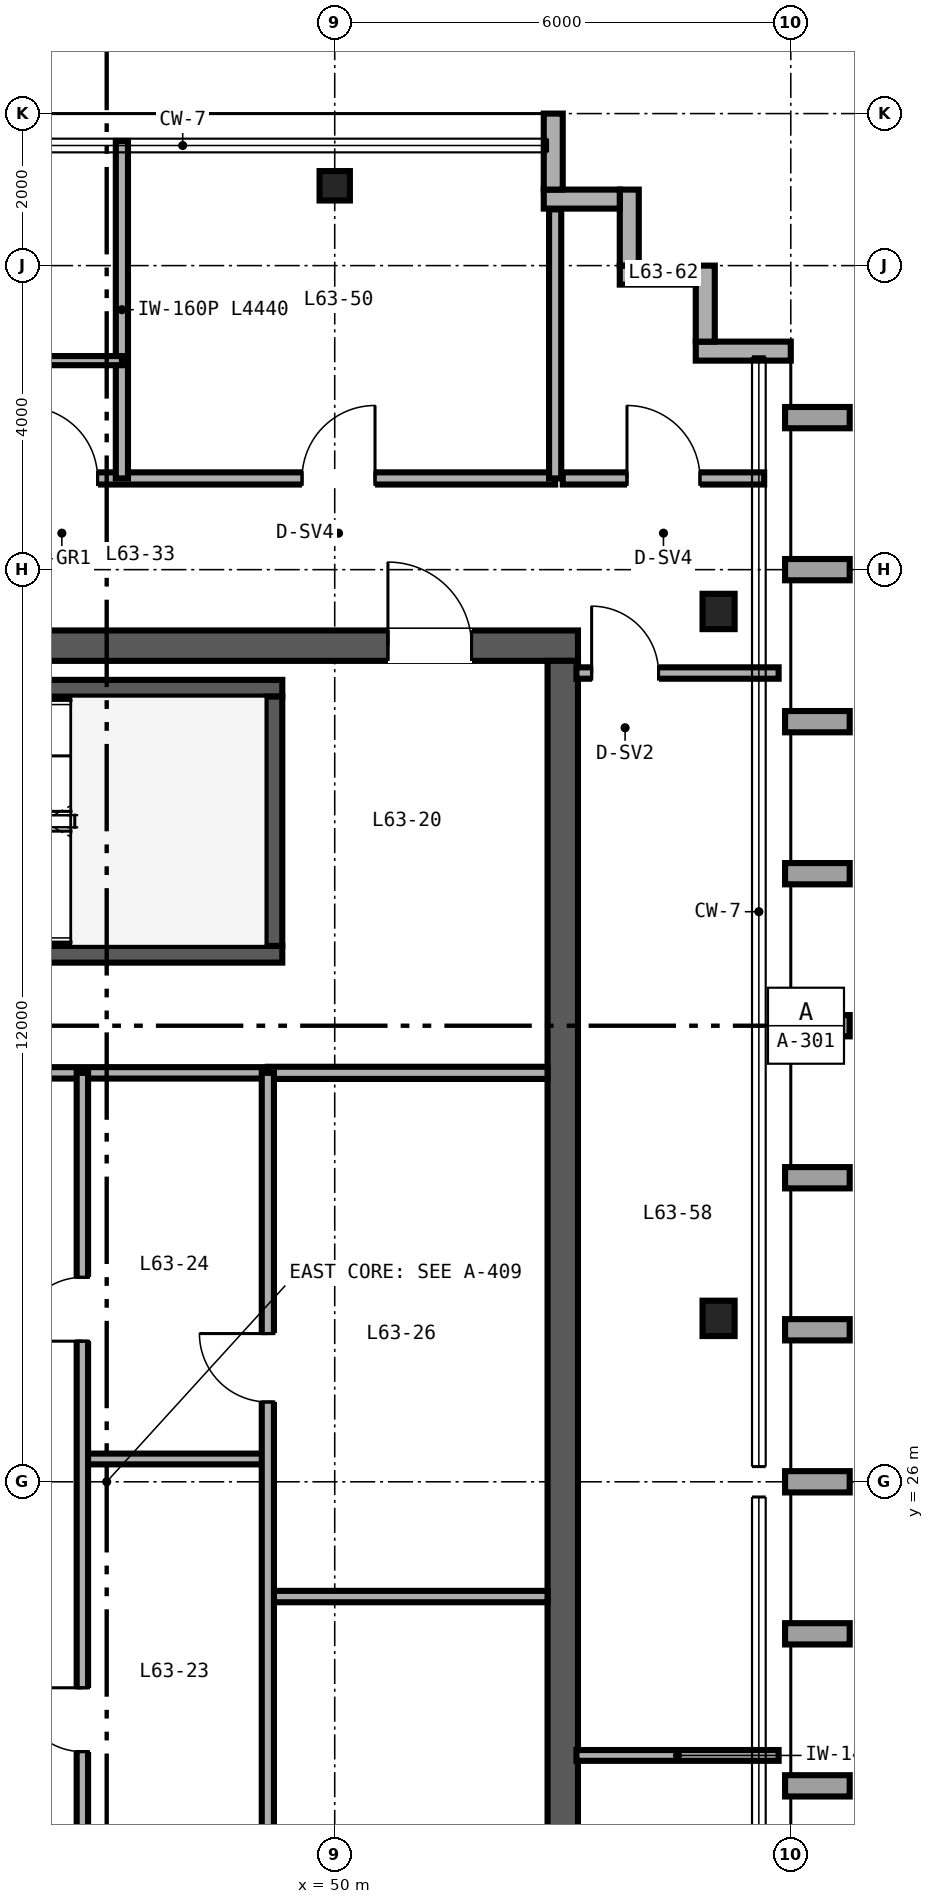
"""IFC4 building model, lengths in metres.
Left out: names, types, materials, properties, quantities, classifications, styles, units other than length and angle.
Written with IfcOpenShell. Run it as: python <this file> out.ifc"""

import sys

from ifc_helpers import new_model, si_unit, direction, frame, frame_2d, origin, origin_2d, place, context, subcontext, project, spatial, rectangle, i_section, extrude, source, transform, mapped, element, fill, save


model = new_model("IFC4")
c1 = context("Model", 3, precision=1e-05, world=origin(), true_north=direction((0.0, 1.0)))
c2 = subcontext(c1, "Body", "Model", "MODEL_VIEW")
j1 = project(units=[si_unit("LENGTHUNIT", "METRE"), si_unit("PLANEANGLEUNIT", "RADIAN")], contexts=[c1])
p1 = place(None, origin())
s1 = spatial("IfcSite", under=j1, at=p1, CompositionType="ELEMENT")
p2 = place(p1, origin())
s2 = spatial("IfcBuilding", under=s1, at=p2, CompositionType="ELEMENT")
p3 = place(p2, frame((0.0, 0.0, 250.8)))
s3 = spatial("IfcBuildingStorey", under=s2, at=p3, CompositionType="ELEMENT", Elevation=250.8)
p4 = place(p3, frame((40.8, 37.0, 0.0), z_axis=(0.0, 0.0, 1.0), x_axis=(1.0, 0.0, 0.0)))
e1 = element("IfcWall", 1, at=p4, inside=s3, PredefinedType="SHEAR", context=c2, shape_type="SweptSolid", body=[
    extrude(rectangle(XDim=12.4, YDim=0.4, at=frame_2d((6.2, 0.0))), origin(), (0.0, 0.0, 1.0), 3.38),
])
p5 = place(p4, frame((9.9, 0.0, 0.0)))
e2 = element("IfcOpeningElement", 2, at=p5, cuts=e1, PredefinedType="OPENING", context=c2, shape_type="SweptSolid", body=[
    extrude(rectangle(XDim=1.1, YDim=2.15, at=frame_2d((0.55, 1.075))), frame((0.0, 0.21, 0.0), z_axis=(0.0, -1.0, 0.0), x_axis=(1.0, 0.0, 0.0)), (0.0, 0.0, 1.0), 0.42),
])
p6 = place(p3, frame((53.0, 15.2, 0.0), z_axis=(0.0, 0.0, 1.0), x_axis=(0.0, 1.0, 0.0)))
e3 = element("IfcWall", 3, at=p6, inside=s3, PredefinedType="SHEAR", context=c2, shape_type="SweptSolid", body=[
    extrude(rectangle(XDim=21.6, YDim=0.4, at=frame_2d((10.8, 0.0))), origin(), (0.0, 0.0, 1.0), 3.38),
])
p7 = place(p3, frame((41.2, 32.94, 0.0), z_axis=(0.0, 0.0, 1.0), x_axis=(1.0, 0.0, 0.0)))
e4 = element("IfcWall", 4, at=p7, inside=s3, PredefinedType="SHEAR", context=c2, shape_type="SweptSolid", body=[
    extrude(rectangle(XDim=8.11, YDim=0.22, at=frame_2d((4.055, 0.0))), origin(), (0.0, 0.0, 1.0), 3.4),
])
p8 = place(p7, frame((0.72, 0.0, 0.0)))
e5 = element("IfcOpeningElement", 5, at=p8, cuts=e4, PredefinedType="OPENING", context=c2, shape_type="SweptSolid", body=[
    extrude(rectangle(XDim=1.05, YDim=2.15, at=frame_2d((0.525, 1.075))), frame((0.0, 0.12, 0.0), z_axis=(0.0, -1.0, 0.0), x_axis=(1.0, 0.0, 0.0)), (0.0, 0.0, 1.0), 0.24),
])
p9 = place(p3, frame((41.2, 36.44, 0.0), z_axis=(0.0, 0.0, 1.0), x_axis=(1.0, 0.0, 0.0)))
e6 = element("IfcWall", 6, at=p9, inside=s3, PredefinedType="SHEAR", context=c2, shape_type="SweptSolid", body=[
    extrude(rectangle(XDim=8.11, YDim=0.22, at=frame_2d((4.055, 0.0))), origin(), (0.0, 0.0, 1.0), 3.4),
])
p10 = place(p3, frame((49.2, 33.05, 0.0), z_axis=(0.0, 0.0, 1.0), x_axis=(0.0, 1.0, 0.0)))
e7 = element("IfcWall", 7, at=p10, inside=s3, PredefinedType="SHEAR", context=c2, shape_type="SweptSolid", body=[
    extrude(rectangle(XDim=3.28, YDim=0.22, at=frame_2d((1.64, 0.0))), origin(), (0.0, 0.0, 1.0), 3.4),
])
m1 = source(origin(), c2, "Body", "SweptSolid", [
    extrude(i_section(OverallWidth=0.422, OverallDepth=0.465, WebThickness=0.045, FlangeThickness=0.073, FilletRadius=0.025, at=origin_2d()), origin(), (0.0, 0.0, 1.0), 3.38),
])
for number, where, z_axis, x_axis in (
    (8, (55.05, 28.15, 0.0), (0.0, 0.0, 1.0), (1.0, 0.0, 0.0)),
    (9, (55.05, 37.45, 0.0), (0.0, 0.0, 1.0), (1.0, 0.0, 0.0)),
):
    element("IfcColumn", number, at=place(p3, frame(where, z_axis=z_axis, x_axis=x_axis)), inside=s3, PredefinedType="COLUMN", context=c2, shape_type="MappedRepresentation", body=[
        mapped(m1, transform((0.0, 0.0, 0.0), scale=1.0)),
    ])
m2 = source(origin(), c2, "Body", "SweptSolid", [
    extrude(i_section(OverallWidth=0.399, OverallDepth=0.387, WebThickness=0.021, FlangeThickness=0.033, FilletRadius=0.025, at=origin_2d()), origin(), (0.0, 0.0, 1.0), 3.38),
])
p11 = place(p3, frame((50.0, 43.05, 0.0), z_axis=(0.0, 0.0, 1.0), x_axis=(1.0, 0.0, 0.0)))
e10 = element("IfcColumn", 10, at=p11, inside=s3, PredefinedType="COLUMN", context=c2, shape_type="MappedRepresentation", body=[
    mapped(m2, transform((0.0, 0.0, 0.0), scale=1.0)),
])
p12 = place(p3, frame((56.0, 40.875, 0.0), z_axis=(0.0, 0.0, 1.0), x_axis=(-1.0, 0.0, 0.0)))
e11 = element("IfcWall", 11, at=p12, inside=s3, PredefinedType="SOLIDWALL", context=c2, shape_type="SweptSolid", body=[
    extrude(rectangle(XDim=1.25, YDim=0.25, at=frame_2d((0.625, 0.0))), origin(), (0.0, 0.0, 1.0), 3.38),
])
for number, where, z_axis, x_axis in (
    (12, (54.875, 41.0, 0.0), (0.0, 0.0, 1.0), (0.0, 1.0, 0.0)),
    (13, (54.75, 41.875, 0.0), (0.0, 0.0, 1.0), (-1.0, 0.0, 0.0)),
    (14, (53.875, 42.0, 0.0), (0.0, 0.0, 1.0), (0.0, 1.0, 0.0)),
    (15, (53.75, 42.875, 0.0), (0.0, 0.0, 1.0), (-1.0, 0.0, 0.0)),
    (16, (52.875, 43.0, 0.0), (0.0, 0.0, 1.0), (0.0, 1.0, 0.0)),
):
    element("IfcWall", number, at=place(p3, frame(where, z_axis=z_axis, x_axis=x_axis)), inside=s3, PredefinedType="SOLIDWALL", context=c2, shape_type="SweptSolid", body=[
        extrude(rectangle(XDim=1.0, YDim=0.25, at=frame_2d((0.5, 0.0))), origin(), (0.0, 0.0, 1.0), 3.38),
    ])
p13 = place(p3, frame((41.25, 31.38, 0.0), z_axis=(0.0, 0.0, 1.0), x_axis=(1.0, 0.0, 0.0)))
e17 = element("IfcWall", 17, at=p13, inside=s3, PredefinedType="PARTITIONING", context=c2, shape_type="SweptSolid", body=[
    extrude(rectangle(XDim=7.87, YDim=0.15, at=frame_2d((3.935, 0.0))), origin(), (0.0, 0.0, 1.0), 2.48),
])
p14 = place(p13, frame((3.6, 0.0, 0.0)))
e18 = element("IfcOpeningElement", 18, at=p14, cuts=e17, PredefinedType="OPENING", context=c2, shape_type="SweptSolid", body=[
    extrude(rectangle(XDim=0.9, YDim=2.15, at=frame_2d((0.45, 1.075))), frame((0.0, 0.085, 0.0), z_axis=(0.0, -1.0, 0.0), x_axis=(1.0, 0.0, 0.0)), (0.0, 0.0, 1.0), 0.17),
])
p15 = place(p3, frame((46.68, 26.3, 0.0), z_axis=(0.0, 0.0, 1.0), x_axis=(1.0, 0.0, 0.0)))
e19 = element("IfcWall", 19, at=p15, inside=s3, PredefinedType="PARTITIONING", context=c2, shape_type="SweptSolid", body=[
    extrude(rectangle(XDim=2.44, YDim=0.142, at=frame_2d((1.22, 0.0))), origin(), (0.0, 0.0, 1.0), 3.38),
])
p16 = place(p3, frame((46.68, 15.25, 0.0), z_axis=(0.0, 0.0, 1.0), x_axis=(0.0, 1.0, 0.0)))
e20 = element("IfcWall", 20, at=p16, inside=s3, PredefinedType="PARTITIONING", context=c2, shape_type="SweptSolid", body=[
    extrude(rectangle(XDim=16.13, YDim=0.15, at=frame_2d((8.065, 0.0))), origin(), (0.0, 0.0, 1.0), 2.453),
])
p17 = place(p16, frame((2.0, 0.0, 0.0)))
e21 = element("IfcOpeningElement", 21, at=p17, cuts=e20, PredefinedType="OPENING", context=c2, shape_type="SweptSolid", body=[
    extrude(rectangle(XDim=0.84, YDim=2.1, at=frame_2d((0.42, 1.05))), frame((0.0, 0.085, 0.0), z_axis=(0.0, -1.0, 0.0), x_axis=(1.0, 0.0, 0.0)), (0.0, 0.0, 1.0), 0.17),
])
p18 = place(p16, frame((7.2, 0.0, 0.0)))
e22 = element("IfcOpeningElement", 22, at=p18, cuts=e20, PredefinedType="OPENING", context=c2, shape_type="SweptSolid", body=[
    extrude(rectangle(XDim=0.84, YDim=2.1, at=frame_2d((0.42, 1.05))), frame((0.0, 0.085, 0.0), z_axis=(0.0, -1.0, 0.0), x_axis=(1.0, 0.0, 0.0)), (0.0, 0.0, 1.0), 0.17),
])
p19 = place(p16, frame((12.6, 0.0, 0.0)))
e23 = element("IfcOpeningElement", 23, at=p19, cuts=e20, PredefinedType="OPENING", context=c2, shape_type="SweptSolid", body=[
    extrude(rectangle(XDim=0.84, YDim=2.1, at=frame_2d((0.42, 1.05))), frame((0.0, 0.085, 0.0), z_axis=(0.0, -1.0, 0.0), x_axis=(1.0, 0.0, 0.0)), (0.0, 0.0, 1.0), 0.17),
])
p20 = place(p3, frame((49.12, 31.38, 0.0), z_axis=(0.0, 0.0, 1.0), x_axis=(1.0, 0.0, 0.0)))
e24 = element("IfcWall", 24, at=p20, inside=s3, PredefinedType="PARTITIONING", context=c2, shape_type="SweptSolid", body=[
    extrude(rectangle(XDim=3.68, YDim=0.16, at=frame_2d((1.84, 0.0))), origin(), (0.0, 0.0, 1.0), 2.48),
])
p21 = place(p3, frame((49.12, 24.49, 0.0), z_axis=(0.0, 0.0, 1.0), x_axis=(1.0, 0.0, 0.0)))
e25 = element("IfcWall", 25, at=p21, inside=s3, PredefinedType="PARTITIONING", context=c2, shape_type="SweptSolid", body=[
    extrude(rectangle(XDim=3.68, YDim=0.15, at=frame_2d((1.84, 0.0))), origin(), (0.0, 0.0, 1.0), 3.38),
])
p22 = place(p3, frame((49.12, 15.25, 0.0), z_axis=(0.0, 0.0, 1.0), x_axis=(0.0, 1.0, 0.0)))
e26 = element("IfcWall", 26, at=p22, inside=s3, PredefinedType="PARTITIONING", context=c2, shape_type="SweptSolid", body=[
    extrude(rectangle(XDim=16.13, YDim=0.16, at=frame_2d((8.065, 0.0))), origin(), (0.0, 0.0, 1.0), 2.453),
])
p23 = place(p22, frame((3.8, 0.0, 0.0)))
e27 = element("IfcOpeningElement", 27, at=p23, cuts=e26, PredefinedType="OPENING", context=c2, shape_type="SweptSolid", body=[
    extrude(rectangle(XDim=0.92, YDim=2.15, at=frame_2d((0.46, 1.075))), frame((0.0, 0.09, 0.0), z_axis=(0.0, -1.0, 0.0), x_axis=(1.0, 0.0, 0.0)), (0.0, 0.0, 1.0), 0.18),
])
p24 = place(p22, frame((11.8, 0.0, 0.0)))
e28 = element("IfcOpeningElement", 28, at=p24, cuts=e26, PredefinedType="OPENING", context=c2, shape_type="SweptSolid", body=[
    extrude(rectangle(XDim=0.9, YDim=2.15, at=frame_2d((0.45, 1.075))), frame((0.0, 0.09, 0.0), z_axis=(0.0, -1.0, 0.0), x_axis=(1.0, 0.0, 0.0)), (0.0, 0.0, 1.0), 0.18),
])
p25 = place(p3, frame((41.38, 39.2, 0.0), z_axis=(0.0, 0.0, 1.0), x_axis=(1.0, 0.0, 0.0)))
e29 = element("IfcWall", 29, at=p25, inside=s3, PredefinedType="PARTITIONING", context=c2, shape_type="SweptSolid", body=[
    extrude(rectangle(XDim=11.52, YDim=0.16, at=frame_2d((5.76, 0.0))), origin(), (0.0, 0.0, 1.0), 3.38),
])
p26 = place(p25, frame((4.56, 0.0, 0.0)))
e30 = element("IfcOpeningElement", 30, at=p26, cuts=e29, PredefinedType="OPENING", context=c2, shape_type="SweptSolid", body=[
    extrude(rectangle(XDim=0.94, YDim=2.15, at=frame_2d((0.47, 1.075))), frame((0.0, 0.09, 0.0), z_axis=(0.0, -1.0, 0.0), x_axis=(1.0, 0.0, 0.0)), (0.0, 0.0, 1.0), 0.18),
])
p27 = place(p25, frame((8.19, 0.0, 0.0)))
e31 = element("IfcOpeningElement", 31, at=p27, cuts=e29, PredefinedType="OPENING", context=c2, shape_type="SweptSolid", body=[
    extrude(rectangle(XDim=0.96, YDim=2.15, at=frame_2d((0.48, 1.075))), frame((0.0, 0.09, 0.0), z_axis=(0.0, -1.0, 0.0), x_axis=(1.0, 0.0, 0.0)), (0.0, 0.0, 1.0), 0.18),
])
p28 = place(p3, frame((52.9, 39.2, 0.0), z_axis=(0.0, 0.0, 1.0), x_axis=(0.0, 1.0, 0.0)))
e32 = element("IfcWall", 32, at=p28, inside=s3, PredefinedType="PARTITIONING", context=c2, shape_type="SweptSolid", body=[
    extrude(rectangle(XDim=3.54, YDim=0.16, at=frame_2d((1.77, 0.0))), origin(), (0.0, 0.0, 1.0), 3.38),
])
p29 = place(p3, frame((47.2, 39.2, 0.0), z_axis=(0.0, 0.0, 1.0), x_axis=(0.0, 1.0, 0.0)))
e33 = element("IfcWall", 33, at=p29, inside=s3, PredefinedType="PARTITIONING", context=c2, shape_type="SweptSolid", body=[
    extrude(rectangle(XDim=4.44, YDim=0.16, at=frame_2d((2.22, 0.0))), origin(), (0.0, 0.0, 1.0), 2.687),
])
p30 = place(p3, frame((46.1, 40.75, 0.0), z_axis=(0.0, 0.0, 1.0), x_axis=(1.0, 0.0, 0.0)))
e34 = element("IfcWall", 34, at=p30, inside=s3, PredefinedType="PARTITIONING", context=c2, shape_type="SweptSolid", body=[
    extrude(rectangle(XDim=1.1, YDim=0.12, at=frame_2d((0.55, 0.0))), origin(), (0.0, 0.0, 1.0), 3.38),
])
p31 = place(p3, frame((53.18, 36.64, 0.0), z_axis=(0.0, 0.0, 1.0), x_axis=(1.0, 0.0, 0.0)))
e35 = element("IfcWall", 35, at=p31, inside=s3, PredefinedType="PARTITIONING", context=c2, shape_type="SweptSolid", body=[
    extrude(rectangle(XDim=2.66, YDim=0.15, at=frame_2d((1.33, 0.0))), origin(), (0.0, 0.0, 1.0), 2.763),
])
p32 = place(p31, frame((0.2, 0.0, 0.0)))
e36 = element("IfcOpeningElement", 36, at=p32, cuts=e35, PredefinedType="OPENING", context=c2, shape_type="SweptSolid", body=[
    extrude(rectangle(XDim=0.88, YDim=2.15, at=frame_2d((0.44, 1.075))), frame((0.0, 0.085, 0.0), z_axis=(0.0, -1.0, 0.0), x_axis=(1.0, 0.0, 0.0)), (0.0, 0.0, 1.0), 0.17),
])
p33 = place(p3, frame((53.18, 22.4, 0.0), z_axis=(0.0, 0.0, 1.0), x_axis=(1.0, 0.0, 0.0)))
e37 = element("IfcWall", 37, at=p33, inside=s3, PredefinedType="PARTITIONING", context=c2, shape_type="SweptSolid", body=[
    extrude(rectangle(XDim=2.66, YDim=0.142, at=frame_2d((1.33, 0.0))), origin(), (0.0, 0.0, 1.0), 2.601),
])
p34 = place(p3, frame((53.0, 39.2, 0.0), z_axis=(0.0, 0.0, 1.0), x_axis=(1.0, 0.0, 0.0)))
e38 = element("IfcWall", 38, at=p34, inside=s3, PredefinedType="PARTITIONING", context=c2, shape_type="SweptSolid", body=[
    extrude(rectangle(XDim=2.65, YDim=0.16, at=frame_2d((1.325, 0.0))), origin(), (0.0, 0.0, 1.0), 3.38),
])
p35 = place(p34, frame((0.845, 0.0, 0.0)))
e39 = element("IfcOpeningElement", 39, at=p35, cuts=e38, PredefinedType="OPENING", context=c2, shape_type="SweptSolid", body=[
    extrude(rectangle(XDim=0.96, YDim=2.15, at=frame_2d((0.48, 1.075))), frame((0.0, 0.09, 0.0), z_axis=(0.0, -1.0, 0.0), x_axis=(1.0, 0.0, 0.0)), (0.0, 0.0, 1.0), 0.18),
])
m3 = source(origin(), c2, "Body", "SweptSolid", [
    extrude(rectangle(XDim=0.84, YDim=2.1, at=frame_2d((0.42, 1.05))), frame((0.0, 0.025, 0.0), z_axis=(0.0, -1.0, 0.0), x_axis=(1.0, 0.0, 0.0)), (0.0, 0.0, 1.0), 0.05),
])
p36 = place(p18, origin())
e40 = element("IfcDoor", 40, at=p36, inside=s3, OperationType="SINGLE_SWING_RIGHT", PredefinedType="DOOR", context=c2, shape_type="MappedRepresentation", body=[
    mapped(m3, transform((0.0, 0.0, 0.0), scale=1.0)),
])
fill(e22, e40)
p37 = place(p19, origin())
e41 = element("IfcDoor", 41, at=p37, inside=s3, OperationType="SINGLE_SWING_LEFT", PredefinedType="DOOR", context=c2, shape_type="MappedRepresentation", body=[
    mapped(m3, transform((0.0, 0.0, 0.0), scale=1.0)),
])
fill(e23, e41)
m4 = source(origin(), c2, "Body", "SweptSolid", [
    extrude(rectangle(XDim=1.1, YDim=2.15, at=frame_2d((0.55, 1.075))), frame((0.0, 0.025, 0.0), z_axis=(0.0, -1.0, 0.0), x_axis=(1.0, 0.0, 0.0)), (0.0, 0.0, 1.0), 0.05),
])
p38 = place(p5, origin())
e42 = element("IfcDoor", 42, at=p38, inside=s3, OperationType="SINGLE_SWING_LEFT", PredefinedType="DOOR", context=c2, shape_type="MappedRepresentation", body=[
    mapped(m4, transform((0.0, 0.0, 0.0), scale=1.0)),
])
fill(e2, e42)
m5 = source(origin(), c2, "Body", "SweptSolid", [
    extrude(rectangle(XDim=0.9, YDim=2.15, at=frame_2d((0.45, 1.075))), frame((0.0, 0.025, 0.0), z_axis=(0.0, -1.0, 0.0), x_axis=(1.0, 0.0, 0.0)), (0.0, 0.0, 1.0), 0.05),
])
p39 = place(p24, origin())
e43 = element("IfcDoor", 43, at=p39, inside=s3, OperationType="SINGLE_SWING_RIGHT", PredefinedType="DOOR", context=c2, shape_type="MappedRepresentation", body=[
    mapped(m5, transform((0.0, 0.0, 0.0), scale=1.0)),
])
fill(e28, e43)
m6 = source(origin(), c2, "Body", "SweptSolid", [
    extrude(rectangle(XDim=0.94, YDim=2.15, at=frame_2d((0.47, 1.075))), frame((0.0, 0.025, 0.0), z_axis=(0.0, -1.0, 0.0), x_axis=(1.0, 0.0, 0.0)), (0.0, 0.0, 1.0), 0.05),
])
p40 = place(p26, origin())
e44 = element("IfcDoor", 44, at=p40, inside=s3, OperationType="SINGLE_SWING_LEFT", PredefinedType="DOOR", context=c2, shape_type="MappedRepresentation", body=[
    mapped(m6, transform((0.0, 0.0, 0.0), scale=1.0)),
])
fill(e30, e44)
m7 = source(origin(), c2, "Body", "SweptSolid", [
    extrude(rectangle(XDim=0.96, YDim=2.15, at=frame_2d((0.48, 1.075))), frame((0.0, 0.025, 0.0), z_axis=(0.0, -1.0, 0.0), x_axis=(1.0, 0.0, 0.0)), (0.0, 0.0, 1.0), 0.05),
])
p41 = place(p27, origin())
e45 = element("IfcDoor", 45, at=p41, inside=s3, OperationType="SINGLE_SWING_RIGHT", PredefinedType="DOOR", context=c2, shape_type="MappedRepresentation", body=[
    mapped(m7, transform((0.0, 0.0, 0.0), scale=1.0)),
])
fill(e31, e45)
m8 = source(origin(), c2, "Body", "SweptSolid", [
    extrude(rectangle(XDim=0.88, YDim=2.15, at=frame_2d((0.44, 1.075))), frame((0.0, 0.025, 0.0), z_axis=(0.0, -1.0, 0.0), x_axis=(1.0, 0.0, 0.0)), (0.0, 0.0, 1.0), 0.05),
])
p42 = place(p32, origin())
e46 = element("IfcDoor", 46, at=p42, inside=s3, OperationType="SINGLE_SWING_LEFT", PredefinedType="DOOR", context=c2, shape_type="MappedRepresentation", body=[
    mapped(m8, transform((0.0, 0.0, 0.0), scale=1.0)),
])
fill(e36, e46)
p43 = place(p35, origin())
e47 = element("IfcDoor", 47, at=p43, inside=s3, OperationType="SINGLE_SWING_LEFT", PredefinedType="DOOR", context=c2, shape_type="MappedRepresentation", body=[
    mapped(m7, transform((0.0, 0.0, 0.0), scale=1.0)),
])
fill(e39, e47)
save(model, sys.argv[1])
